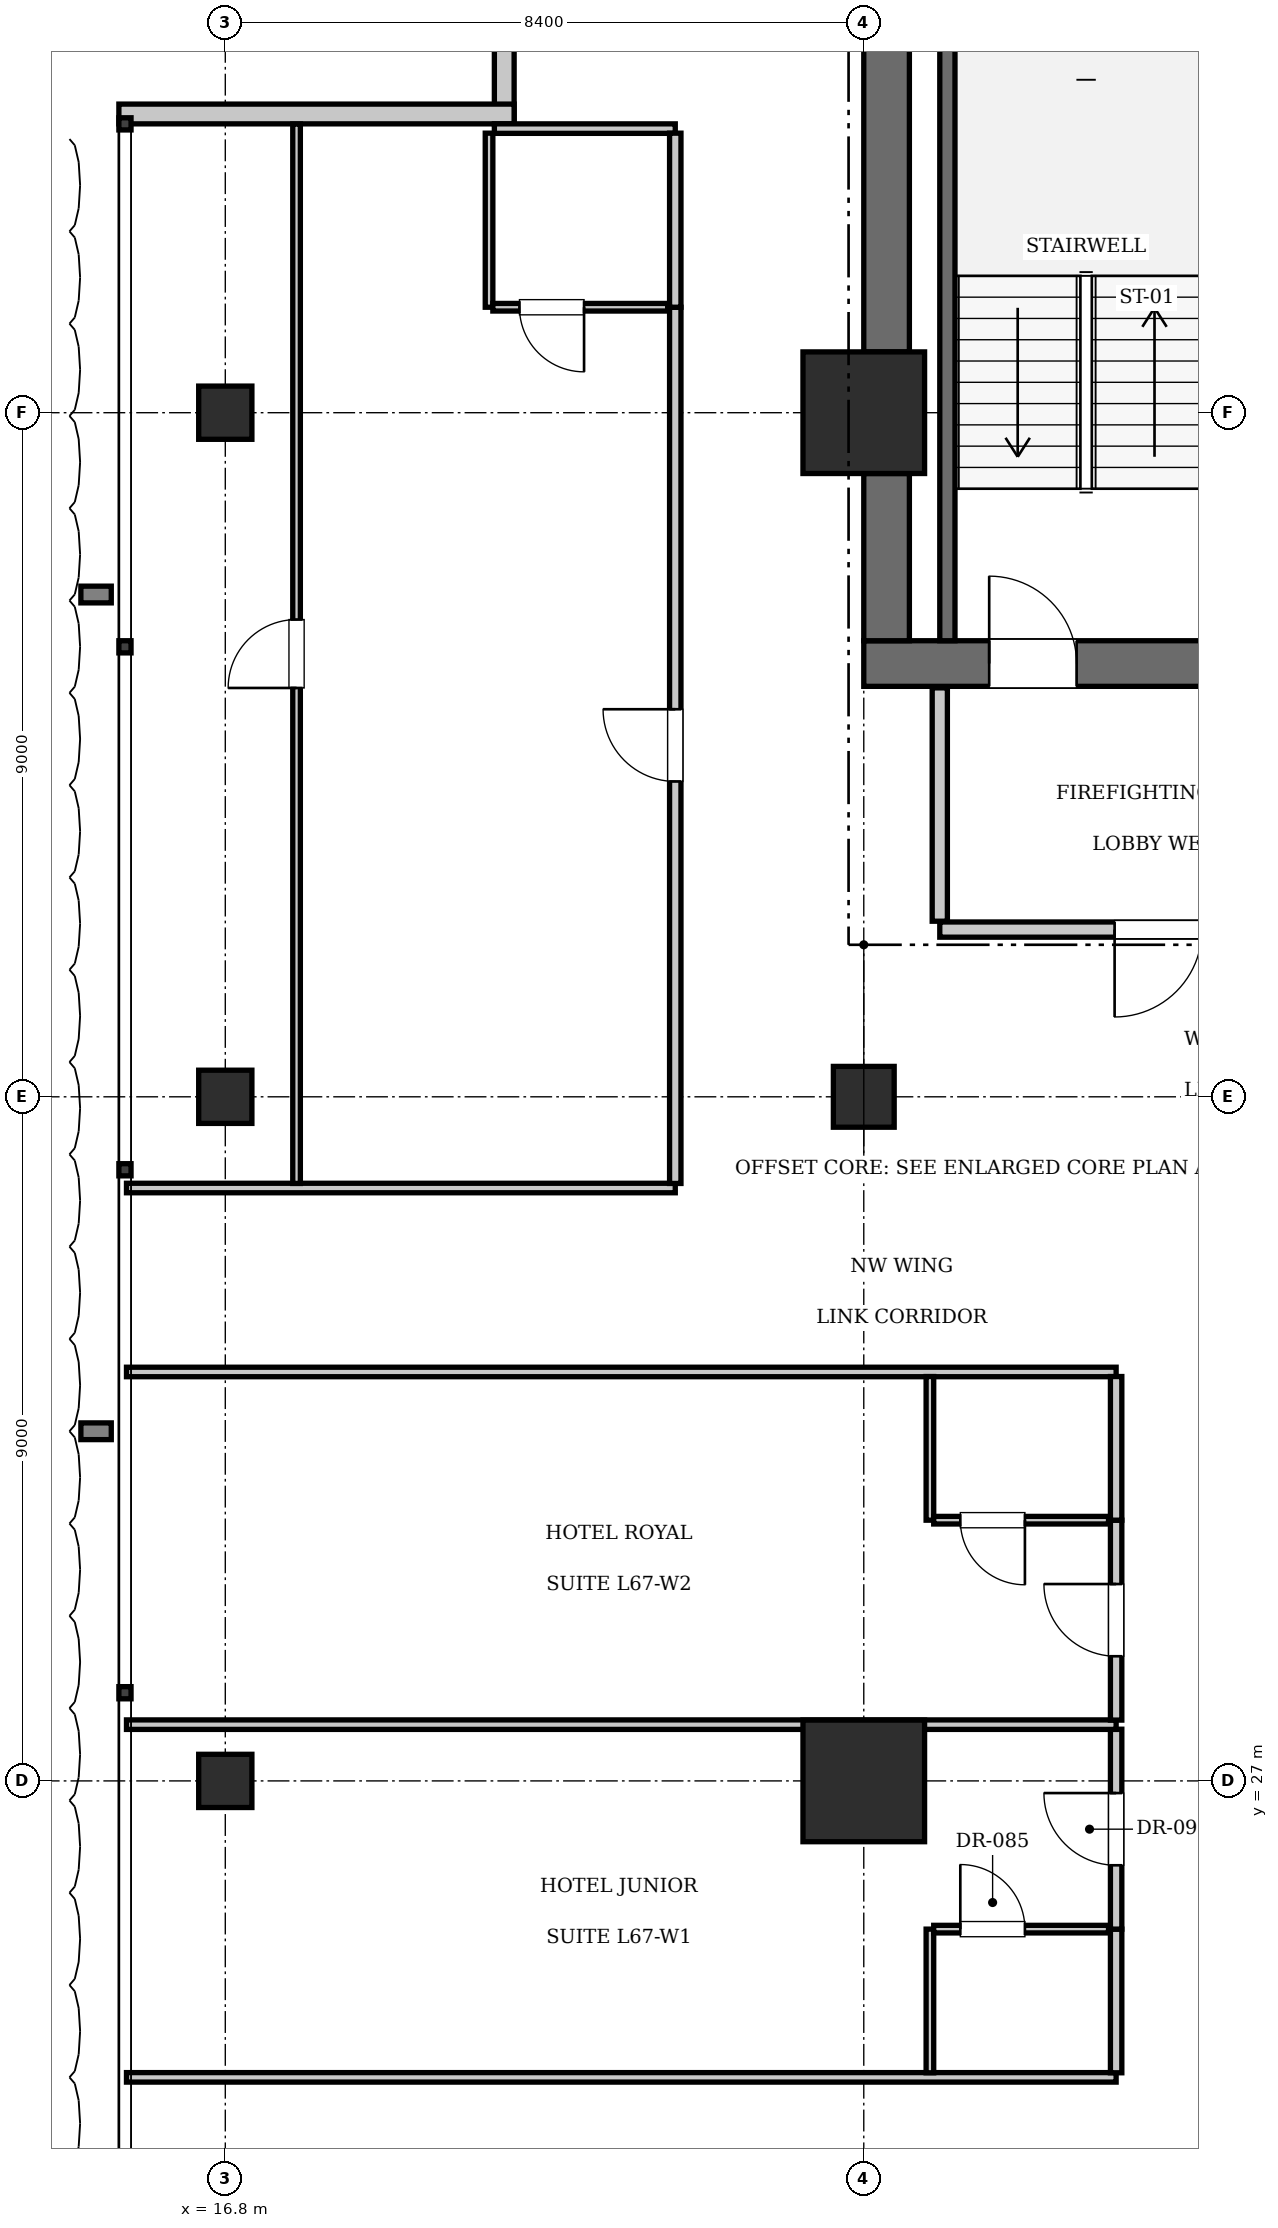
"""IFC4 building model, lengths in metres.
Left out: names, types, materials, properties, quantities, classifications, styles, units other than length and angle.
Written with IfcOpenShell. Run it as: python <this file> out.ifc"""

import sys

from ifc_helpers import new_model, si_unit, direction, frame, frame_2d, origin, origin_2d, place, context, subcontext, project, spatial, rectangle, extrude, element, fill, save


model = new_model("IFC4")
c1 = context("Model", 3, precision=1e-05, world=origin(), true_north=direction((0.0, 1.0)))
c2 = subcontext(c1, "Body", "Model", "MODEL_VIEW")
j1 = project(units=[si_unit("LENGTHUNIT", "METRE"), si_unit("PLANEANGLEUNIT", "RADIAN")], contexts=[c1])
p1 = place(None, origin())
s1 = spatial("IfcSite", under=j1, at=p1, CompositionType="ELEMENT")
p2 = place(p1, origin())
s2 = spatial("IfcBuilding", under=s1, at=p2, CompositionType="ELEMENT")
p3 = place(p2, frame((0.0, 0.0, 274.05)))
s3 = spatial("IfcBuildingStorey", under=s2, at=p3, CompositionType="ELEMENT", Elevation=274.05)
for number, where, z_axis, x_axis in (
    (1, (25.2, 27.0, 0.0), (0.0, 0.0, 1.0), (1.0, 0.0, 0.0)),
    (2, (25.2, 45.0, 0.0), (0.0, 0.0, 1.0), (1.0, 0.0, 0.0)),
):
    element("IfcColumn", number, at=place(p3, frame(where, z_axis=z_axis, x_axis=x_axis)), inside=s3, PredefinedType="COLUMN", context=c2, shape_type="SweptSolid", body=[
        extrude(rectangle(XDim=1.6, YDim=1.6, at=origin_2d()), origin(), (0.0, 0.0, 1.0), 3.85),
    ])
p4 = place(p3, frame((25.2, 41.7, 0.0), z_axis=(0.0, 0.0, 1.0), x_axis=(1.0, 0.0, 0.0)))
e3 = element("IfcWall", 3, at=p4, inside=s3, PredefinedType="SHEAR", context=c2, shape_type="SweptSolid", body=[
    extrude(rectangle(XDim=6.8, YDim=0.6, at=frame_2d((3.4, 0.0))), origin(), (0.0, 0.0, 1.0), 3.85),
])
p5 = place(p4, frame((1.65, 0.0, 0.0)))
e4 = element("IfcOpeningElement", 4, at=p5, cuts=e3, PredefinedType="OPENING", context=c2, shape_type="SweptSolid", body=[
    extrude(rectangle(XDim=1.15, YDim=2.15, at=frame_2d((0.575, 1.075))), frame((0.0, 0.31, 0.0), z_axis=(0.0, -1.0, 0.0), x_axis=(1.0, 0.0, 0.0)), (0.0, 0.0, 1.0), 0.62),
])
p6 = place(p4, frame((5.15, 0.0, 0.0)))
e5 = element("IfcOpeningElement", 5, at=p6, cuts=e3, PredefinedType="OPENING", context=c2, shape_type="SweptSolid", body=[
    extrude(rectangle(XDim=1.1, YDim=2.2, at=frame_2d((0.55, 1.1))), frame((0.0, 0.31, 0.0), z_axis=(0.0, -1.0, 0.0), x_axis=(1.0, 0.0, 0.0)), (0.0, 0.0, 1.0), 0.62),
])
p7 = place(p3, frame((25.5, 42.0, 0.0), z_axis=(0.0, 0.0, 1.0), x_axis=(0.0, 1.0, 0.0)))
e6 = element("IfcWall", 6, at=p7, inside=s3, PredefinedType="SHEAR", context=c2, shape_type="SweptSolid", body=[
    extrude(rectangle(XDim=2.2, YDim=0.6, at=frame_2d((1.1, 0.0))), origin(), (0.0, 0.0, 1.0), 3.85),
])
p8 = place(p3, frame((25.5, 45.8, 0.0), z_axis=(0.0, 0.0, 1.0), x_axis=(0.0, 1.0, 0.0)))
e7 = element("IfcWall", 7, at=p8, inside=s3, PredefinedType="SHEAR", context=c2, shape_type="SweptSolid", body=[
    extrude(rectangle(XDim=7.6, YDim=0.6, at=frame_2d((3.8, 0.0))), origin(), (0.0, 0.0, 1.0), 3.85),
])
p9 = place(p3, frame((25.2, 36.0, 0.0), z_axis=(0.0, 0.0, 1.0), x_axis=(1.0, 0.0, 0.0)))
e8 = element("IfcColumn", 8, at=p9, inside=s3, PredefinedType="COLUMN", context=c2, shape_type="SweptSolid", body=[
    extrude(rectangle(XDim=0.8, YDim=0.8, at=origin_2d()), origin(), (0.0, 0.0, 1.0), 3.85),
])
for number, where, z_axis, x_axis in (
    (9, (16.8, 27.0, 0.0), (0.0, 0.0, 1.0), (1.0, 0.0, 0.0)),
    (10, (16.8, 36.0, 0.0), (0.0, 0.0, 1.0), (1.0, 0.0, 0.0)),
    (11, (16.8, 45.0, 0.0), (0.0, 0.0, 1.0), (1.0, 0.0, 0.0)),
):
    element("IfcColumn", number, at=place(p3, frame(where, z_axis=z_axis, x_axis=x_axis)), inside=s3, PredefinedType="COLUMN", context=c2, shape_type="SweptSolid", body=[
        extrude(rectangle(XDim=0.7, YDim=0.7, at=origin_2d()), origin(), (0.0, 0.0, 1.0), 3.85),
    ])
p10 = place(p3, frame((26.3, 42.0, 0.0), z_axis=(0.0, 0.0, 1.0), x_axis=(0.0, 1.0, 0.0)))
e12 = element("IfcWall", 12, at=p10, inside=s3, PredefinedType="SOLIDWALL", context=c2, shape_type="SweptSolid", body=[
    extrude(rectangle(XDim=9.12, YDim=0.2, at=frame_2d((4.56, 0.0))), origin(), (0.0, 0.0, 1.0), 3.61),
])
p11 = place(p3, frame((20.47, 48.8, 0.0), z_axis=(0.0, 0.0, 1.0), x_axis=(0.0, 1.0, 0.0)))
e13 = element("IfcWall", 13, at=p11, inside=s3, PredefinedType="SOLIDWALL", context=c2, shape_type="SweptSolid", body=[
    extrude(rectangle(XDim=5.2, YDim=0.26, at=frame_2d((2.6, 0.0))), origin(), (0.0, 0.0, 1.0), 3.61),
])
p12 = place(p3, frame((15.4, 48.93, 0.0), z_axis=(0.0, 0.0, 1.0), x_axis=(1.0, 0.0, 0.0)))
e14 = element("IfcWall", 14, at=p12, inside=s3, PredefinedType="SOLIDWALL", context=c2, shape_type="SweptSolid", body=[
    extrude(rectangle(XDim=5.2, YDim=0.26, at=frame_2d((2.6, 0.0))), origin(), (0.0, 0.0, 1.0), 3.61),
])
p13 = place(p3, frame((26.2, 38.2, 0.0), z_axis=(0.0, 0.0, 1.0), x_axis=(1.0, 0.0, 0.0)))
e15 = element("IfcWall", 15, at=p13, inside=s3, PredefinedType="PARTITIONING", context=c2, shape_type="SweptSolid", body=[
    extrude(rectangle(XDim=5.8, YDim=0.2, at=frame_2d((2.9, 0.0))), origin(), (0.0, 0.0, 1.0), 3.61),
])
p14 = place(p13, frame((2.3, 0.0, 0.0)))
e16 = element("IfcOpeningElement", 16, at=p14, cuts=e15, PredefinedType="OPENING", context=c2, shape_type="SweptSolid", body=[
    extrude(rectangle(XDim=1.15, YDim=2.15, at=frame_2d((0.575, 1.075))), frame((0.0, 0.11, 0.0), z_axis=(0.0, -1.0, 0.0), x_axis=(1.0, 0.0, 0.0)), (0.0, 0.0, 1.0), 0.22),
])
p15 = place(p3, frame((26.2, 38.31, 0.0), z_axis=(0.0, 0.0, 1.0), x_axis=(0.0, 1.0, 0.0)))
e17 = element("IfcWall", 17, at=p15, inside=s3, PredefinedType="PARTITIONING", context=c2, shape_type="SweptSolid", body=[
    extrude(rectangle(XDim=3.07, YDim=0.2, at=frame_2d((1.535, 0.0))), origin(), (0.0, 0.0, 1.0), 3.61),
])
for number, where, z_axis, x_axis in (
    (18, (15.5, 23.1, 0.0), (0.0, 0.0, 1.0), (1.0, 0.0, 0.0)),
    (19, (15.5, 32.38, 0.0), (0.0, 0.0, 1.0), (1.0, 0.0, 0.0)),
):
    element("IfcWall", number, at=place(p3, frame(where, z_axis=z_axis, x_axis=x_axis)), inside=s3, PredefinedType="PARTITIONING", context=c2, shape_type="SweptSolid", body=[
        extrude(rectangle(XDim=13.02, YDim=0.125, at=frame_2d((6.51, 0.0))), origin(), (0.0, 0.0, 1.0), 3.61),
    ])
p16 = place(p3, frame((28.52, 23.16, 0.0), z_axis=(0.0, 0.0, 1.0), x_axis=(0.0, 1.0, 0.0)))
e20 = element("IfcWall", 20, at=p16, inside=s3, PredefinedType="PARTITIONING", context=c2, shape_type="SweptSolid", body=[
    extrude(rectangle(XDim=1.89, YDim=0.15, at=frame_2d((0.945, 0.0))), origin(), (0.0, 0.0, 1.0), 3.61),
])
p17 = place(p3, frame((28.52, 25.05, 0.0), z_axis=(0.0, 0.0, 1.0), x_axis=(0.0, 1.0, 0.0)))
e21 = element("IfcWall", 21, at=p17, inside=s3, PredefinedType="PARTITIONING", context=c2, shape_type="SweptSolid", body=[
    extrude(rectangle(XDim=2.63, YDim=0.15, at=frame_2d((1.315, 0.0))), origin(), (0.0, 0.0, 1.0), 3.61),
])
p18 = place(p17, frame((0.84, 0.0, 0.0)))
e22 = element("IfcOpeningElement", 22, at=p18, cuts=e21, PredefinedType="OPENING", context=c2, shape_type="SweptSolid", body=[
    extrude(rectangle(XDim=0.95, YDim=2.15, at=frame_2d((0.475, 1.075))), frame((0.0, 0.085, 0.0), z_axis=(0.0, -1.0, 0.0), x_axis=(1.0, 0.0, 0.0)), (0.0, 0.0, 1.0), 0.17),
])
p19 = place(p3, frame((26.07, 23.16, 0.0), z_axis=(0.0, 0.0, 1.0), x_axis=(0.0, 1.0, 0.0)))
e23 = element("IfcWall", 23, at=p19, inside=s3, PredefinedType="PARTITIONING", context=c2, shape_type="SweptSolid", body=[
    extrude(rectangle(XDim=1.89, YDim=0.1, at=frame_2d((0.945, 0.0))), origin(), (0.0, 0.0, 1.0), 3.61),
])
p20 = place(p3, frame((26.12, 25.05, 0.0), z_axis=(0.0, 0.0, 1.0), x_axis=(1.0, 0.0, 0.0)))
e24 = element("IfcWall", 24, at=p20, inside=s3, PredefinedType="PARTITIONING", context=c2, shape_type="SweptSolid", body=[
    extrude(rectangle(XDim=2.3, YDim=0.1, at=frame_2d((1.15, 0.0))), origin(), (0.0, 0.0, 1.0), 3.61),
])
p21 = place(p20, frame((0.35, 0.0, 0.0)))
e25 = element("IfcOpeningElement", 25, at=p21, cuts=e24, PredefinedType="OPENING", context=c2, shape_type="SweptSolid", body=[
    extrude(rectangle(XDim=0.85, YDim=2.1, at=frame_2d((0.425, 1.05))), frame((0.0, 0.06, 0.0), z_axis=(0.0, -1.0, 0.0), x_axis=(1.0, 0.0, 0.0)), (0.0, 0.0, 1.0), 0.12),
])
p22 = place(p3, frame((15.5, 27.74, 0.0), z_axis=(0.0, 0.0, 1.0), x_axis=(1.0, 0.0, 0.0)))
e26 = element("IfcWall", 26, at=p22, inside=s3, PredefinedType="PARTITIONING", context=c2, shape_type="SweptSolid", body=[
    extrude(rectangle(XDim=13.02, YDim=0.125, at=frame_2d((6.51, 0.0))), origin(), (0.0, 0.0, 1.0), 3.61),
])
p23 = place(p3, frame((28.52, 27.8, 0.0), z_axis=(0.0, 0.0, 1.0), x_axis=(0.0, 1.0, 0.0)))
e27 = element("IfcWall", 27, at=p23, inside=s3, PredefinedType="PARTITIONING", context=c2, shape_type="SweptSolid", body=[
    extrude(rectangle(XDim=2.63, YDim=0.15, at=frame_2d((1.315, 0.0))), origin(), (0.0, 0.0, 1.0), 3.61),
])
p24 = place(p23, frame((0.84, 0.0, 0.0)))
e28 = element("IfcOpeningElement", 28, at=p24, cuts=e27, PredefinedType="OPENING", context=c2, shape_type="SweptSolid", body=[
    extrude(rectangle(XDim=0.95, YDim=2.15, at=frame_2d((0.475, 1.075))), frame((0.0, 0.085, 0.0), z_axis=(0.0, -1.0, 0.0), x_axis=(1.0, 0.0, 0.0)), (0.0, 0.0, 1.0), 0.17),
])
p25 = place(p3, frame((28.52, 30.43, 0.0), z_axis=(0.0, 0.0, 1.0), x_axis=(0.0, 1.0, 0.0)))
e29 = element("IfcWall", 29, at=p25, inside=s3, PredefinedType="PARTITIONING", context=c2, shape_type="SweptSolid", body=[
    extrude(rectangle(XDim=1.89, YDim=0.15, at=frame_2d((0.945, 0.0))), origin(), (0.0, 0.0, 1.0), 3.61),
])
p26 = place(p3, frame((26.07, 30.43, 0.0), z_axis=(0.0, 0.0, 1.0), x_axis=(0.0, 1.0, 0.0)))
e30 = element("IfcWall", 30, at=p26, inside=s3, PredefinedType="PARTITIONING", context=c2, shape_type="SweptSolid", body=[
    extrude(rectangle(XDim=1.89, YDim=0.1, at=frame_2d((0.945, 0.0))), origin(), (0.0, 0.0, 1.0), 3.61),
])
p27 = place(p3, frame((26.12, 30.43, 0.0), z_axis=(0.0, 0.0, 1.0), x_axis=(1.0, 0.0, 0.0)))
e31 = element("IfcWall", 31, at=p27, inside=s3, PredefinedType="PARTITIONING", context=c2, shape_type="SweptSolid", body=[
    extrude(rectangle(XDim=2.3, YDim=0.1, at=frame_2d((1.15, 0.0))), origin(), (0.0, 0.0, 1.0), 3.61),
])
p28 = place(p27, frame((0.35, 0.0, 0.0)))
e32 = element("IfcOpeningElement", 32, at=p28, cuts=e31, PredefinedType="OPENING", context=c2, shape_type="SweptSolid", body=[
    extrude(rectangle(XDim=0.85, YDim=2.1, at=frame_2d((0.425, 1.05))), frame((0.0, 0.06, 0.0), z_axis=(0.0, -1.0, 0.0), x_axis=(1.0, 0.0, 0.0)), (0.0, 0.0, 1.0), 0.12),
])
p29 = place(p3, frame((15.5, 34.8, 0.0), z_axis=(0.0, 0.0, 1.0), x_axis=(1.0, 0.0, 0.0)))
e33 = element("IfcWall", 33, at=p29, inside=s3, PredefinedType="PARTITIONING", context=c2, shape_type="SweptSolid", body=[
    extrude(rectangle(XDim=7.22, YDim=0.125, at=frame_2d((3.61, 0.0))), origin(), (0.0, 0.0, 1.0), 3.61),
])
p30 = place(p3, frame((20.34, 48.738, 0.0), z_axis=(0.0, 0.0, 1.0), x_axis=(1.0, 0.0, 0.0)))
e34 = element("IfcWall", 34, at=p30, inside=s3, PredefinedType="PARTITIONING", context=c2, shape_type="SweptSolid", body=[
    extrude(rectangle(XDim=2.38, YDim=0.125, at=frame_2d((1.19, 0.0))), origin(), (0.0, 0.0, 1.0), 3.61),
])
p31 = place(p3, frame((22.72, 34.86, 0.0), z_axis=(0.0, 0.0, 1.0), x_axis=(0.0, 1.0, 0.0)))
e35 = element("IfcWall", 35, at=p31, inside=s3, PredefinedType="PARTITIONING", context=c2, shape_type="SweptSolid", body=[
    extrude(rectangle(XDim=11.527, YDim=0.15, at=frame_2d((5.764, 0.0))), origin(), (0.0, 0.0, 1.0), 3.61),
])
p32 = place(p31, frame((5.289, 0.0, 0.0)))
e36 = element("IfcOpeningElement", 36, at=p32, cuts=e35, PredefinedType="OPENING", context=c2, shape_type="SweptSolid", body=[
    extrude(rectangle(XDim=0.95, YDim=2.15, at=frame_2d((0.475, 1.075))), frame((0.0, 0.085, 0.0), z_axis=(0.0, -1.0, 0.0), x_axis=(1.0, 0.0, 0.0)), (0.0, 0.0, 1.0), 0.17),
])
p33 = place(p3, frame((22.72, 46.387, 0.0), z_axis=(0.0, 0.0, 1.0), x_axis=(0.0, 1.0, 0.0)))
e37 = element("IfcWall", 37, at=p33, inside=s3, PredefinedType="PARTITIONING", context=c2, shape_type="SweptSolid", body=[
    extrude(rectangle(XDim=2.29, YDim=0.15, at=frame_2d((1.145, 0.0))), origin(), (0.0, 0.0, 1.0), 3.61),
])
p34 = place(p3, frame((20.27, 46.387, 0.0), z_axis=(0.0, 0.0, 1.0), x_axis=(0.0, 1.0, 0.0)))
e38 = element("IfcWall", 38, at=p34, inside=s3, PredefinedType="PARTITIONING", context=c2, shape_type="SweptSolid", body=[
    extrude(rectangle(XDim=2.29, YDim=0.1, at=frame_2d((1.145, 0.0))), origin(), (0.0, 0.0, 1.0), 3.61),
])
p35 = place(p3, frame((20.32, 46.387, 0.0), z_axis=(0.0, 0.0, 1.0), x_axis=(1.0, 0.0, 0.0)))
e39 = element("IfcWall", 39, at=p35, inside=s3, PredefinedType="PARTITIONING", context=c2, shape_type="SweptSolid", body=[
    extrude(rectangle(XDim=2.3, YDim=0.1, at=frame_2d((1.15, 0.0))), origin(), (0.0, 0.0, 1.0), 3.61),
])
p36 = place(p35, frame((0.35, 0.0, 0.0)))
e40 = element("IfcOpeningElement", 40, at=p36, cuts=e39, PredefinedType="OPENING", context=c2, shape_type="SweptSolid", body=[
    extrude(rectangle(XDim=0.85, YDim=2.1, at=frame_2d((0.425, 1.05))), frame((0.0, 0.06, 0.0), z_axis=(0.0, -1.0, 0.0), x_axis=(1.0, 0.0, 0.0)), (0.0, 0.0, 1.0), 0.12),
])
p37 = place(p3, frame((17.738, 34.86, 0.0), z_axis=(0.0, 0.0, 1.0), x_axis=(0.0, 1.0, 0.0)))
e41 = element("IfcWall", 41, at=p37, inside=s3, PredefinedType="PARTITIONING", context=c2, shape_type="SweptSolid", body=[
    extrude(rectangle(XDim=13.938, YDim=0.1, at=frame_2d((6.969, 0.0))), origin(), (0.0, 0.0, 1.0), 3.61),
])
p38 = place(p37, frame((6.519, 0.0, 0.0)))
e42 = element("IfcOpeningElement", 42, at=p38, cuts=e41, PredefinedType="OPENING", context=c2, shape_type="SweptSolid", body=[
    extrude(rectangle(XDim=0.9, YDim=2.1, at=frame_2d((0.45, 1.05))), frame((0.0, 0.06, 0.0), z_axis=(0.0, -1.0, 0.0), x_axis=(1.0, 0.0, 0.0)), (0.0, 0.0, 1.0), 0.12),
])
p39 = place(p5, origin())
e43 = element("IfcDoor", 43, at=p39, inside=s3, OperationType="SINGLE_SWING_LEFT", PredefinedType="DOOR", context=c2, shape_type="SweptSolid", body=[
    extrude(rectangle(XDim=1.15, YDim=2.15, at=frame_2d((0.575, 1.075))), frame((0.0, 0.025, 0.0), z_axis=(0.0, -1.0, 0.0), x_axis=(1.0, 0.0, 0.0)), (0.0, 0.0, 1.0), 0.05),
])
fill(e4, e43)
p40 = place(p14, frame((1.15, 0.0, 0.0), z_axis=(0.0, 0.0, 1.0), x_axis=(-1.0, 0.0, 0.0)))
e44 = element("IfcDoor", 44, at=p40, inside=s3, OperationType="SINGLE_SWING_RIGHT", PredefinedType="DOOR", context=c2, shape_type="SweptSolid", body=[
    extrude(rectangle(XDim=1.15, YDim=2.15, at=frame_2d((0.575, 1.075))), frame((0.0, 0.025, 0.0), z_axis=(0.0, -1.0, 0.0), x_axis=(1.0, 0.0, 0.0)), (0.0, 0.0, 1.0), 0.05),
])
fill(e16, e44)
p41 = place(p21, origin())
e45 = element("IfcDoor", 45, at=p41, inside=s3, OperationType="SINGLE_SWING_LEFT", PredefinedType="DOOR", context=c2, shape_type="SweptSolid", body=[
    extrude(rectangle(XDim=0.85, YDim=2.1, at=frame_2d((0.425, 1.05))), frame((0.0, 0.025, 0.0), z_axis=(0.0, -1.0, 0.0), x_axis=(1.0, 0.0, 0.0)), (0.0, 0.0, 1.0), 0.05),
])
fill(e25, e45)
p42 = place(p18, origin())
e46 = element("IfcDoor", 46, at=p42, inside=s3, OperationType="SINGLE_SWING_RIGHT", PredefinedType="DOOR", context=c2, shape_type="SweptSolid", body=[
    extrude(rectangle(XDim=0.95, YDim=2.15, at=frame_2d((0.475, 1.075))), frame((0.0, 0.025, 0.0), z_axis=(0.0, -1.0, 0.0), x_axis=(1.0, 0.0, 0.0)), (0.0, 0.0, 1.0), 0.05),
])
fill(e22, e46)
p43 = place(p28, frame((0.85, 0.0, 0.0), z_axis=(0.0, 0.0, 1.0), x_axis=(-1.0, 0.0, 0.0)))
e47 = element("IfcDoor", 47, at=p43, inside=s3, OperationType="SINGLE_SWING_LEFT", PredefinedType="DOOR", context=c2, shape_type="SweptSolid", body=[
    extrude(rectangle(XDim=0.85, YDim=2.1, at=frame_2d((0.425, 1.05))), frame((0.0, 0.025, 0.0), z_axis=(0.0, -1.0, 0.0), x_axis=(1.0, 0.0, 0.0)), (0.0, 0.0, 1.0), 0.05),
])
fill(e32, e47)
p44 = place(p24, origin())
e48 = element("IfcDoor", 48, at=p44, inside=s3, OperationType="SINGLE_SWING_RIGHT", PredefinedType="DOOR", context=c2, shape_type="SweptSolid", body=[
    extrude(rectangle(XDim=0.95, YDim=2.15, at=frame_2d((0.475, 1.075))), frame((0.0, 0.025, 0.0), z_axis=(0.0, -1.0, 0.0), x_axis=(1.0, 0.0, 0.0)), (0.0, 0.0, 1.0), 0.05),
])
fill(e28, e48)
p45 = place(p36, frame((0.85, 0.0, 0.0), z_axis=(0.0, 0.0, 1.0), x_axis=(-1.0, 0.0, 0.0)))
e49 = element("IfcDoor", 49, at=p45, inside=s3, OperationType="SINGLE_SWING_LEFT", PredefinedType="DOOR", context=c2, shape_type="SweptSolid", body=[
    extrude(rectangle(XDim=0.85, YDim=2.1, at=frame_2d((0.425, 1.05))), frame((0.0, 0.025, 0.0), z_axis=(0.0, -1.0, 0.0), x_axis=(1.0, 0.0, 0.0)), (0.0, 0.0, 1.0), 0.05),
])
fill(e40, e49)
p46 = place(p32, origin())
e50 = element("IfcDoor", 50, at=p46, inside=s3, OperationType="SINGLE_SWING_RIGHT", PredefinedType="DOOR", context=c2, shape_type="SweptSolid", body=[
    extrude(rectangle(XDim=0.95, YDim=2.15, at=frame_2d((0.475, 1.075))), frame((0.0, 0.025, 0.0), z_axis=(0.0, -1.0, 0.0), x_axis=(1.0, 0.0, 0.0)), (0.0, 0.0, 1.0), 0.05),
])
fill(e36, e50)
p47 = place(p38, origin())
e51 = element("IfcDoor", 51, at=p47, inside=s3, OperationType="SINGLE_SWING_LEFT", PredefinedType="DOOR", context=c2, shape_type="SweptSolid", body=[
    extrude(rectangle(XDim=0.9, YDim=2.1, at=frame_2d((0.45, 1.05))), frame((0.0, 0.025, 0.0), z_axis=(0.0, -1.0, 0.0), x_axis=(1.0, 0.0, 0.0)), (0.0, 0.0, 1.0), 0.05),
])
fill(e42, e51)
save(model, sys.argv[1])
